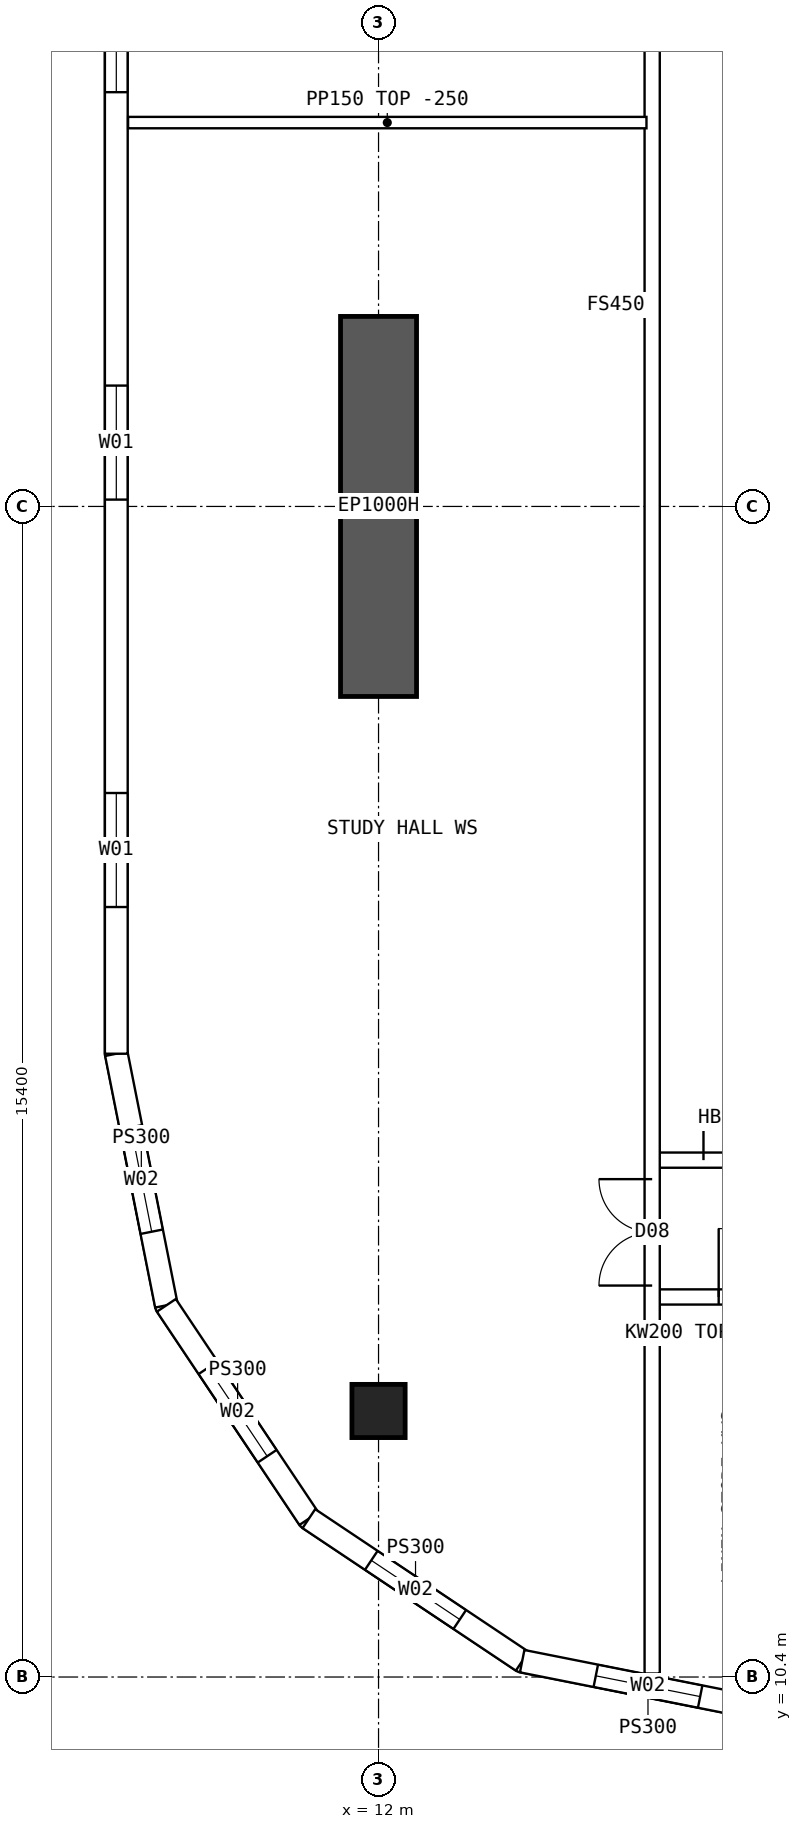
"""IFC4 building model, lengths in metres.
Left out: names, types, materials, properties, quantities, classifications, styles, units other than length and angle.
Written with IfcOpenShell. Run it as: python <this file> out.ifc"""

import sys

from ifc_helpers import new_model, si_unit, direction, frame, frame_2d, origin, origin_2d, place, context, subcontext, project, spatial, polyline, rectangle, hollow_rectangle, outline, extrude, element, fill, save


model = new_model("IFC4")
c1 = context("Model", 3, precision=1e-05, world=origin(), true_north=direction((0.0, 1.0)))
c2 = subcontext(c1, "Body", "Model", "MODEL_VIEW")
j1 = project(units=[si_unit("LENGTHUNIT", "METRE"), si_unit("PLANEANGLEUNIT", "RADIAN")], contexts=[c1])
p1 = place(None, origin())
s1 = spatial("IfcSite", under=j1, at=p1, CompositionType="ELEMENT")
p2 = place(p1, origin())
s2 = spatial("IfcBuilding", under=s1, at=p2, CompositionType="ELEMENT")
p3 = place(p2, frame((0.0, 0.0, 148.6)))
s3 = spatial("IfcBuildingStorey", under=s2, at=p3, CompositionType="ELEMENT", Elevation=148.6)
p4 = place(p3, frame((12.0, 13.9, 0.0), z_axis=(0.0, 0.0, 1.0), x_axis=(1.0, 0.0, 0.0)))
e1 = element("IfcColumn", 1, at=p4, inside=s3, PredefinedType="COLUMN", context=c2, shape_type="SweptSolid", body=[
    extrude(hollow_rectangle(XDim=0.7, YDim=0.7, WallThickness=0.07, at=origin_2d()), origin(), (0.0, 0.0, 1.0), 3.75),
])
p5 = place(p3, frame((12.0, 23.3, 0.0), z_axis=(0.0, 0.0, 1.0), x_axis=(0.0, 1.0, 0.0)))
e2 = element("IfcWall", 2, at=p5, inside=s3, PredefinedType="SHEAR", context=c2, shape_type="SweptSolid", body=[
    extrude(rectangle(XDim=5.0, YDim=1.0, at=frame_2d((2.5, 0.0))), origin(), (0.0, 0.0, 1.0), 3.75),
])
p6 = place(p3, frame((8.55, 45.4, 0.0), z_axis=(0.0, 0.0, 1.0), x_axis=(0.0, -1.0, 0.0)))
e3 = element("IfcWall", 3, at=p6, inside=s3, PredefinedType="SOLIDWALL", context=c2, shape_type="SweptSolid", body=[
    extrude(outline(polyline([(-0.015, -0.15), (26.815, -0.15), (26.785, 0.15), (0.015, 0.15), (-0.015, -0.15)])), origin(), (0.0, 0.0, 1.0), 3.5),
])
p7 = place(p6, frame((1.93, 0.0, 0.9)))
e4 = element("IfcOpeningElement", 4, at=p7, cuts=e3, PredefinedType="OPENING", context=c2, shape_type="SweptSolid", body=[
    extrude(rectangle(XDim=1.5, YDim=2.0, at=frame_2d((0.75, 1.0))), frame((0.0, 0.16, 0.0), z_axis=(0.0, -1.0, 0.0), x_axis=(1.0, 0.0, 0.0)), (0.0, 0.0, 1.0), 0.32),
])
p8 = place(p6, frame((7.29, 0.0, 0.9)))
e5 = element("IfcOpeningElement", 5, at=p8, cuts=e3, PredefinedType="OPENING", context=c2, shape_type="SweptSolid", body=[
    extrude(rectangle(XDim=1.5, YDim=2.0, at=frame_2d((0.75, 1.0))), frame((0.0, 0.16, 0.0), z_axis=(0.0, -1.0, 0.0), x_axis=(1.0, 0.0, 0.0)), (0.0, 0.0, 1.0), 0.32),
])
p9 = place(p6, frame((12.65, 0.0, 0.9)))
e6 = element("IfcOpeningElement", 6, at=p9, cuts=e3, PredefinedType="OPENING", context=c2, shape_type="SweptSolid", body=[
    extrude(rectangle(XDim=1.5, YDim=2.0, at=frame_2d((0.75, 1.0))), frame((0.0, 0.16, 0.0), z_axis=(0.0, -1.0, 0.0), x_axis=(1.0, 0.0, 0.0)), (0.0, 0.0, 1.0), 0.32),
])
p10 = place(p6, frame((18.01, 0.0, 0.9)))
e7 = element("IfcOpeningElement", 7, at=p10, cuts=e3, PredefinedType="OPENING", context=c2, shape_type="SweptSolid", body=[
    extrude(rectangle(XDim=1.5, YDim=2.0, at=frame_2d((0.75, 1.0))), frame((0.0, 0.16, 0.0), z_axis=(0.0, -1.0, 0.0), x_axis=(1.0, 0.0, 0.0)), (0.0, 0.0, 1.0), 0.32),
])
p11 = place(p6, frame((23.37, 0.0, 0.9)))
e8 = element("IfcOpeningElement", 8, at=p11, cuts=e3, PredefinedType="OPENING", context=c2, shape_type="SweptSolid", body=[
    extrude(rectangle(XDim=1.5, YDim=2.0, at=frame_2d((0.75, 1.0))), frame((0.0, 0.16, 0.0), z_axis=(0.0, -1.0, 0.0), x_axis=(1.0, 0.0, 0.0)), (0.0, 0.0, 1.0), 0.32),
])
p12 = place(p3, frame((8.55, 18.6, 0.0), z_axis=(0.0, 0.0, 1.0), x_axis=(0.19508664885, -0.980786011034, 0.0)))
e9 = element("IfcWall", 9, at=p12, inside=s3, PredefinedType="SOLIDWALL", context=c2, shape_type="SweptSolid", body=[
    extrude(outline(polyline([(-0.015, -0.15), (3.405, -0.15), (3.345, 0.15), (0.015, 0.15), (-0.015, -0.15)])), origin(), (0.0, 0.0, 1.0), 3.5),
])
p13 = place(p12, frame((0.988, 0.0, 0.9)))
e10 = element("IfcOpeningElement", 10, at=p13, cuts=e9, PredefinedType="OPENING", context=c2, shape_type="SweptSolid", body=[
    extrude(rectangle(XDim=1.4, YDim=1.8, at=frame_2d((0.7, 0.9))), frame((0.0, 0.16, 0.0), z_axis=(0.0, -1.0, 0.0), x_axis=(1.0, 0.0, 0.0)), (0.0, 0.0, 1.0), 0.32),
])
p14 = place(p3, frame((9.208, 15.29, 0.0), z_axis=(0.0, 0.0, 1.0), x_axis=(0.555534554399, -0.831493450887, 0.0)))
e11 = element("IfcWall", 11, at=p14, inside=s3, PredefinedType="SOLIDWALL", context=c2, shape_type="SweptSolid", body=[
    extrude(outline(polyline([(-0.03, -0.15), (3.405, -0.15), (3.345, 0.15), (0.03, 0.15), (-0.03, -0.15)])), origin(), (0.0, 0.0, 1.0), 3.5),
])
p15 = place(p14, frame((0.988, 0.0, 0.9)))
e12 = element("IfcOpeningElement", 12, at=p15, cuts=e11, PredefinedType="OPENING", context=c2, shape_type="SweptSolid", body=[
    extrude(rectangle(XDim=1.4, YDim=1.8, at=frame_2d((0.7, 0.9))), frame((0.0, 0.16, 0.0), z_axis=(0.0, -1.0, 0.0), x_axis=(1.0, 0.0, 0.0)), (0.0, 0.0, 1.0), 0.32),
])
p16 = place(p3, frame((11.083, 12.483, 0.0), z_axis=(0.0, 0.0, 1.0), x_axis=(0.831493450887, -0.555534554399, 0.0)))
e13 = element("IfcWall", 13, at=p16, inside=s3, PredefinedType="SOLIDWALL", context=c2, shape_type="SweptSolid", body=[
    extrude(outline(polyline([(-0.03, -0.15), (3.405, -0.15), (3.345, 0.15), (0.03, 0.15), (-0.03, -0.15)])), origin(), (0.0, 0.0, 1.0), 3.5),
])
p17 = place(p16, frame((0.988, 0.0, 0.9)))
e14 = element("IfcOpeningElement", 14, at=p17, cuts=e13, PredefinedType="OPENING", context=c2, shape_type="SweptSolid", body=[
    extrude(rectangle(XDim=1.4, YDim=1.8, at=frame_2d((0.7, 0.9))), frame((0.0, 0.16, 0.0), z_axis=(0.0, -1.0, 0.0), x_axis=(1.0, 0.0, 0.0)), (0.0, 0.0, 1.0), 0.32),
])
p18 = place(p3, frame((13.89, 10.608, 0.0), z_axis=(0.0, 0.0, 1.0), x_axis=(0.98078325777, -0.195100490205, 0.0)))
e15 = element("IfcWall", 15, at=p18, inside=s3, PredefinedType="SOLIDWALL", context=c2, shape_type="SweptSolid", body=[
    extrude(outline(polyline([(-0.03, -0.15), (3.405, -0.15), (3.345, 0.15), (0.03, 0.15), (-0.03, -0.15)])), origin(), (0.0, 0.0, 1.0), 3.5),
])
p19 = place(p18, frame((0.988, 0.0, 0.9)))
e16 = element("IfcOpeningElement", 16, at=p19, cuts=e15, PredefinedType="OPENING", context=c2, shape_type="SweptSolid", body=[
    extrude(rectangle(XDim=1.4, YDim=1.8, at=frame_2d((0.7, 0.9))), frame((0.0, 0.16, 0.0), z_axis=(0.0, -1.0, 0.0), x_axis=(1.0, 0.0, 0.0)), (0.0, 0.0, 1.0), 0.32),
])
p20 = place(p3, frame((15.6, 15.4, 0.0), z_axis=(0.0, 0.0, 1.0), x_axis=(1.0, 0.0, 0.0)))
e17 = element("IfcWall", 17, at=p20, inside=s3, PredefinedType="SOLIDWALL", context=c2, shape_type="SweptSolid", body=[
    extrude(rectangle(XDim=1.975, YDim=0.2, at=frame_2d((0.987, 0.0))), origin(), (0.0, 0.0, 1.0), 3.5),
])
p21 = place(p20, frame((0.875, 0.0, 0.0)))
e18 = element("IfcOpeningElement", 18, at=p21, cuts=e17, PredefinedType="OPENING", context=c2, shape_type="SweptSolid", body=[
    extrude(rectangle(XDim=0.9, YDim=2.1, at=frame_2d((0.45, 1.05))), frame((0.0, 0.11, 0.0), z_axis=(0.0, -1.0, 0.0), x_axis=(1.0, 0.0, 0.0)), (0.0, 0.0, 1.0), 0.22),
])
p22 = place(p3, frame((15.6, 17.2, 0.0), z_axis=(0.0, 0.0, 1.0), x_axis=(1.0, 0.0, 0.0)))
e19 = element("IfcWall", 19, at=p22, inside=s3, PredefinedType="SOLIDWALL", context=c2, shape_type="SweptSolid", body=[
    extrude(rectangle(XDim=1.975, YDim=0.2, at=frame_2d((0.987, 0.0))), origin(), (0.0, 0.0, 1.0), 3.5),
])
p23 = place(p22, frame((0.675, 0.0, 0.0)))
e20 = element("IfcOpeningElement", 20, at=p23, cuts=e19, PredefinedType="OPENING", context=c2, shape_type="SweptSolid", body=[
    extrude(rectangle(XDim=1.2, YDim=2.1, at=frame_2d((0.6, 1.05))), frame((0.0, 0.11, 0.0), z_axis=(0.0, -1.0, 0.0), x_axis=(1.0, 0.0, 0.0)), (0.0, 0.0, 1.0), 0.22),
])
p24 = place(p3, frame((8.705, 30.85, 0.0), z_axis=(0.0, 0.0, 1.0), x_axis=(1.0, 0.0, 0.0)))
e21 = element("IfcWall", 21, at=p24, inside=s3, PredefinedType="PARTITIONING", context=c2, shape_type="SweptSolid", body=[
    extrude(outline(polyline([(0.0, 0.0), (6.82, 0.0), (6.82, 3.5), (3.597, 3.5), (3.595, 3.05), (2.997, 3.05), (2.995, 3.5), (0.0, 3.5), (0.0, 0.0)])), frame((0.0, 0.075, 0.0), z_axis=(0.0, -1.0, 0.0), x_axis=(1.0, 0.0, 0.0)), (0.0, 0.0, 1.0), 0.15),
])
p25 = place(p3, frame((15.6, 10.446, 0.0), z_axis=(0.0, 0.0, 1.0), x_axis=(0.0, 1.0, 0.0)))
e22 = element("IfcWall", 22, at=p25, inside=s3, PredefinedType="SOLIDWALL", context=c2, shape_type="SweptSolid", body=[
    extrude(rectangle(XDim=43.107, YDim=0.2, at=frame_2d((21.554, 0.0))), origin(), (0.0, 0.0, 1.0), 3.5),
])
p26 = place(p25, frame((5.104, 0.0, 0.0)))
e23 = element("IfcOpeningElement", 23, at=p26, cuts=e22, PredefinedType="OPENING", context=c2, shape_type="SweptSolid", body=[
    extrude(rectangle(XDim=1.4, YDim=2.1, at=frame_2d((0.7, 1.05))), frame((0.0, 0.11, 0.0), z_axis=(0.0, -1.0, 0.0), x_axis=(1.0, 0.0, 0.0)), (0.0, 0.0, 1.0), 0.22),
])
p27 = place(p25, frame((36.504, 0.0, 0.0)))
e24 = element("IfcOpeningElement", 24, at=p27, cuts=e22, PredefinedType="OPENING", context=c2, shape_type="SweptSolid", body=[
    extrude(rectangle(XDim=1.4, YDim=2.1, at=frame_2d((0.7, 1.05))), frame((0.0, 0.11, 0.0), z_axis=(0.0, -1.0, 0.0), x_axis=(1.0, 0.0, 0.0)), (0.0, 0.0, 1.0), 0.22),
])
p28 = place(p9, origin())
e25 = element("IfcWindow", 25, at=p28, inside=s3, PartitioningType="SINGLE_PANEL", PredefinedType="WINDOW", context=c2, shape_type="SweptSolid", body=[
    extrude(rectangle(XDim=1.5, YDim=2.0, at=frame_2d((0.75, 1.0))), frame((0.0, 0.03, 0.0), z_axis=(0.0, -1.0, 0.0), x_axis=(1.0, 0.0, 0.0)), (0.0, 0.0, 1.0), 0.06),
])
fill(e6, e25)
p29 = place(p10, origin())
e26 = element("IfcWindow", 26, at=p29, inside=s3, PartitioningType="SINGLE_PANEL", PredefinedType="WINDOW", context=c2, shape_type="SweptSolid", body=[
    extrude(rectangle(XDim=1.5, YDim=2.0, at=frame_2d((0.75, 1.0))), frame((0.0, 0.03, 0.0), z_axis=(0.0, -1.0, 0.0), x_axis=(1.0, 0.0, 0.0)), (0.0, 0.0, 1.0), 0.06),
])
fill(e7, e26)
p30 = place(p11, origin())
e27 = element("IfcWindow", 27, at=p30, inside=s3, PartitioningType="SINGLE_PANEL", PredefinedType="WINDOW", context=c2, shape_type="SweptSolid", body=[
    extrude(rectangle(XDim=1.5, YDim=2.0, at=frame_2d((0.75, 1.0))), frame((0.0, 0.03, 0.0), z_axis=(0.0, -1.0, 0.0), x_axis=(1.0, 0.0, 0.0)), (0.0, 0.0, 1.0), 0.06),
])
fill(e8, e27)
p31 = place(p13, origin())
e28 = element("IfcWindow", 28, at=p31, inside=s3, PartitioningType="SINGLE_PANEL", PredefinedType="WINDOW", context=c2, shape_type="SweptSolid", body=[
    extrude(rectangle(XDim=1.4, YDim=1.8, at=frame_2d((0.7, 0.9))), frame((0.0, 0.03, 0.0), z_axis=(0.0, -1.0, 0.0), x_axis=(1.0, 0.0, 0.0)), (0.0, 0.0, 1.0), 0.06),
])
fill(e10, e28)
p32 = place(p15, origin())
e29 = element("IfcWindow", 29, at=p32, inside=s3, PartitioningType="SINGLE_PANEL", PredefinedType="WINDOW", context=c2, shape_type="SweptSolid", body=[
    extrude(rectangle(XDim=1.4, YDim=1.8, at=frame_2d((0.7, 0.9))), frame((0.0, 0.03, 0.0), z_axis=(0.0, -1.0, 0.0), x_axis=(1.0, 0.0, 0.0)), (0.0, 0.0, 1.0), 0.06),
])
fill(e12, e29)
p33 = place(p17, origin())
e30 = element("IfcWindow", 30, at=p33, inside=s3, PartitioningType="SINGLE_PANEL", PredefinedType="WINDOW", context=c2, shape_type="SweptSolid", body=[
    extrude(rectangle(XDim=1.4, YDim=1.8, at=frame_2d((0.7, 0.9))), frame((0.0, 0.03, 0.0), z_axis=(0.0, -1.0, 0.0), x_axis=(1.0, 0.0, 0.0)), (0.0, 0.0, 1.0), 0.06),
])
fill(e14, e30)
p34 = place(p19, origin())
e31 = element("IfcWindow", 31, at=p34, inside=s3, PartitioningType="SINGLE_PANEL", PredefinedType="WINDOW", context=c2, shape_type="SweptSolid", body=[
    extrude(rectangle(XDim=1.4, YDim=1.8, at=frame_2d((0.7, 0.9))), frame((0.0, 0.03, 0.0), z_axis=(0.0, -1.0, 0.0), x_axis=(1.0, 0.0, 0.0)), (0.0, 0.0, 1.0), 0.06),
])
fill(e16, e31)
p35 = place(p23, origin())
e32 = element("IfcDoor", 32, at=p35, inside=s3, OperationType="DOUBLE_DOOR_SINGLE_SWING", PredefinedType="DOOR", context=c2, shape_type="SweptSolid", body=[
    extrude(rectangle(XDim=1.2, YDim=2.1, at=frame_2d((0.6, 1.05))), frame((0.0, 0.025, 0.0), z_axis=(0.0, -1.0, 0.0), x_axis=(1.0, 0.0, 0.0)), (0.0, 0.0, 1.0), 0.05),
])
fill(e20, e32)
p36 = place(p26, origin())
e33 = element("IfcDoor", 33, at=p36, inside=s3, OperationType="DOUBLE_DOOR_SINGLE_SWING", PredefinedType="DOOR", context=c2, shape_type="SweptSolid", body=[
    extrude(rectangle(XDim=1.4, YDim=2.1, at=frame_2d((0.7, 1.05))), frame((0.0, 0.025, 0.0), z_axis=(0.0, -1.0, 0.0), x_axis=(1.0, 0.0, 0.0)), (0.0, 0.0, 1.0), 0.05),
])
fill(e23, e33)
p37 = place(p21, origin())
e34 = element("IfcDoor", 34, at=p37, inside=s3, OperationType="SINGLE_SWING_LEFT", PredefinedType="DOOR", context=c2, shape_type="SweptSolid", body=[
    extrude(rectangle(XDim=0.9, YDim=2.1, at=frame_2d((0.45, 1.05))), frame((0.0, 0.025, 0.0), z_axis=(0.0, -1.0, 0.0), x_axis=(1.0, 0.0, 0.0)), (0.0, 0.0, 1.0), 0.05),
])
fill(e18, e34)
save(model, sys.argv[1])
